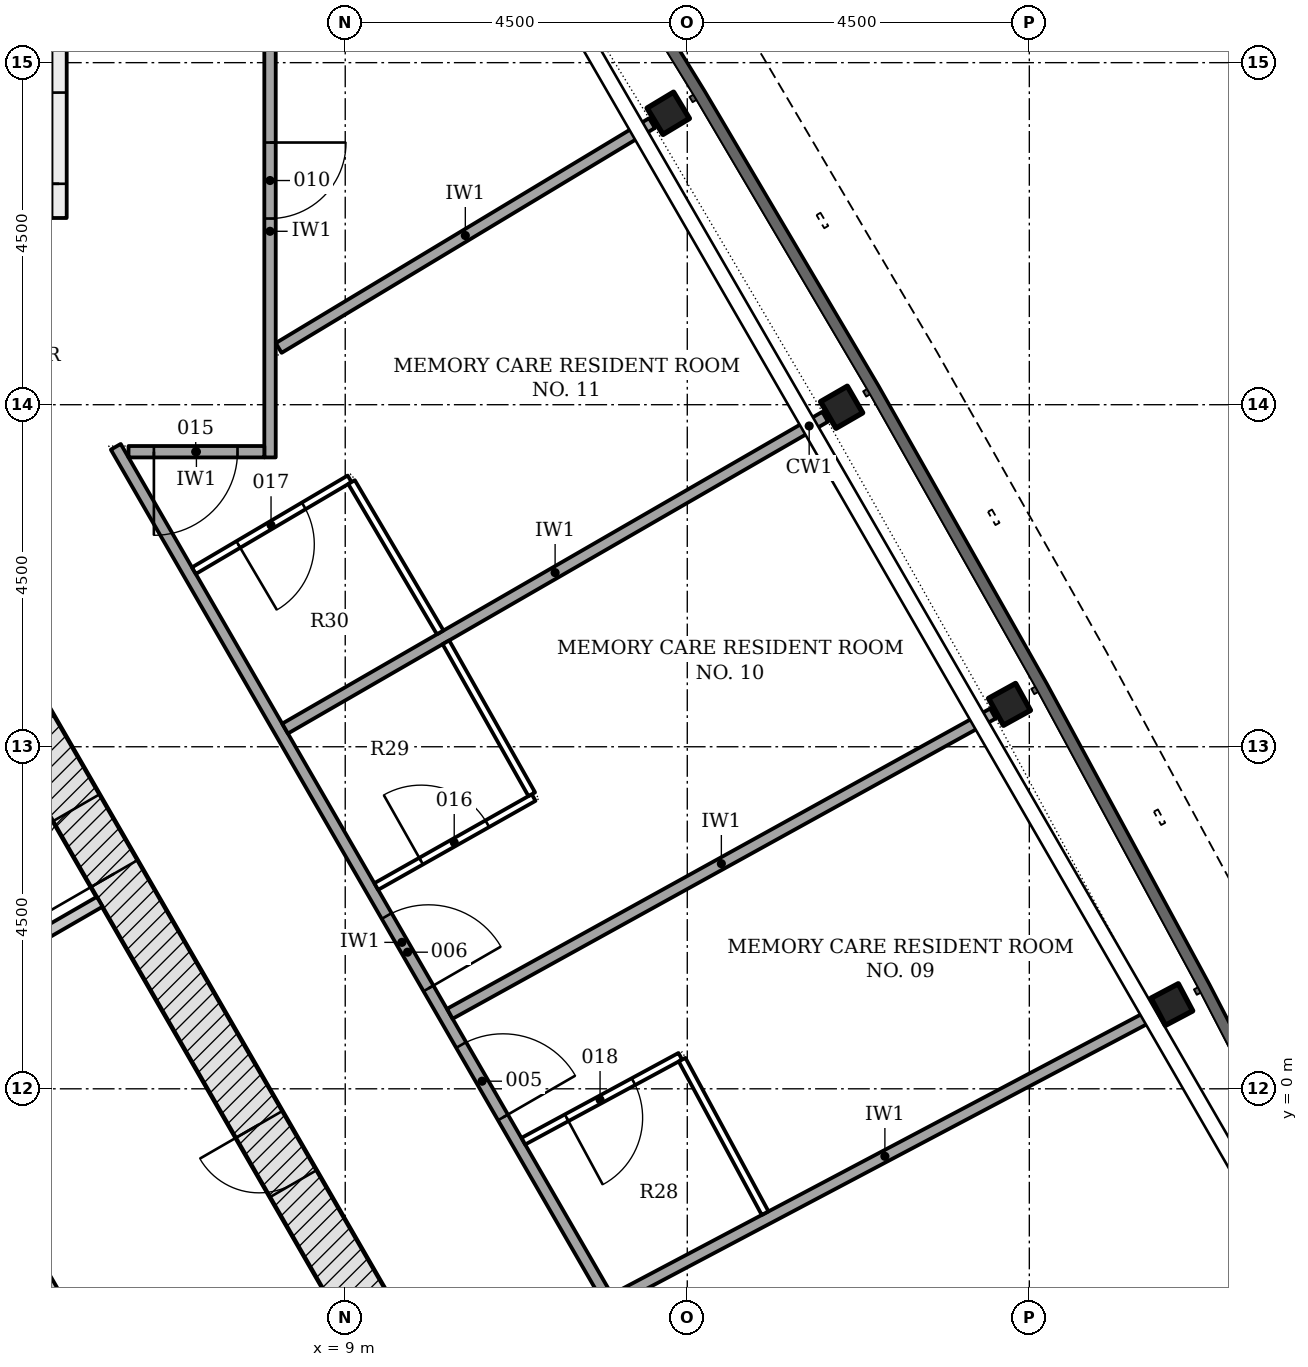
"""IFC4 building model, lengths in metres.
Left out: names, types, materials, properties, quantities, classifications, styles, units other than length and angle.
Written with IfcOpenShell. Run it as: python <this file> out.ifc"""

import sys

from ifc_helpers import new_model, si_unit, direction, frame, frame_2d, origin, origin_2d, place, context, subcontext, project, spatial, rectangle, i_section, extrude, element, fill, save


model = new_model("IFC4")
c1 = context("Model", 3, precision=1e-05, world=origin(), true_north=direction((0.0, 1.0)))
c2 = subcontext(c1, "Body", "Model", "MODEL_VIEW")
j1 = project(units=[si_unit("LENGTHUNIT", "METRE"), si_unit("PLANEANGLEUNIT", "RADIAN")], contexts=[c1])
p1 = place(None, origin())
s1 = spatial("IfcSite", under=j1, at=p1, CompositionType="ELEMENT")
p2 = place(p1, origin())
s2 = spatial("IfcBuilding", under=s1, at=p2, CompositionType="ELEMENT")
p3 = place(p2, frame((0.0, 0.0, 27.6)))
s3 = spatial("IfcBuildingStorey", under=s2, at=p3, CompositionType="ELEMENT", Elevation=27.6)
p4 = place(p3, frame((10.311, -4.703, -0.2), z_axis=(0.0, 0.0, 1.0), x_axis=(-0.500001446645, 0.866024568562, 0.0)))
e1 = element("IfcWall", 1, at=p4, inside=s3, PredefinedType="SHEAR", context=c2, shape_type="SweptSolid", body=[
    extrude(rectangle(XDim=18.458, YDim=0.7, at=frame_2d((9.229, 0.0))), origin(), (0.0, 0.0, 1.0), 3.6),
])
p5 = place(p4, frame((8.7, 0.0, 0.2)))
e2 = element("IfcOpeningElement", 2, at=p5, cuts=e1, PredefinedType="OPENING", context=c2, shape_type="SweptSolid", body=[
    extrude(rectangle(XDim=1.0, YDim=2.1, at=frame_2d((0.5, 1.05))), frame((0.0, 0.36, 0.0), z_axis=(0.0, -1.0, 0.0), x_axis=(1.0, 0.0, 0.0)), (0.0, 0.0, 1.0), 0.72),
])
p6 = place(p4, frame((3.99, 0.0, 0.2)))
e3 = element("IfcOpeningElement", 3, at=p6, cuts=e1, PredefinedType="OPENING", context=c2, shape_type="SweptSolid", body=[
    extrude(rectangle(XDim=0.9, YDim=2.1, at=frame_2d((0.45, 1.05))), frame((0.0, 0.36, 0.0), z_axis=(0.0, -1.0, 0.0), x_axis=(1.0, 0.0, 0.0)), (0.0, 0.0, 1.0), 0.72),
])
p7 = place(p4, frame((13.539, 0.0, 0.2)))
e4 = element("IfcOpeningElement", 4, at=p7, cuts=e1, PredefinedType="OPENING", context=c2, shape_type="SweptSolid", body=[
    extrude(rectangle(XDim=0.9, YDim=2.1, at=frame_2d((0.45, 1.05))), frame((0.0, 0.36, 0.0), z_axis=(0.0, -1.0, 0.0), x_axis=(1.0, 0.0, 0.0)), (0.0, 0.0, 1.0), 0.72),
])
for number, where, z_axis, x_axis in (
    (5, (19.875, 1.108, -0.2), (0.0, 0.0, 1.0), (-0.468, 0.884, 0.0)),
    (6, (17.739, 5.058, -0.2), (0.0, 0.0, 1.0), (-0.484, 0.875, 0.0)),
    (7, (15.531, 8.967, -0.2), (0.0, 0.0, 1.0), (-0.5, 0.866, 0.0)),
    (8, (13.25, 12.834, -0.2), (0.0, 0.0, 1.0), (-0.516, 0.857, 0.0)),
):
    element("IfcColumn", number, at=place(p3, frame(where, z_axis=z_axis, x_axis=x_axis)), inside=s3, PredefinedType="COLUMN", context=c2, shape_type="SweptSolid", body=[
        extrude(i_section(OverallWidth=0.404, OverallDepth=0.406, WebThickness=0.027, FlangeThickness=0.044, FilletRadius=0.015, at=origin_2d()), origin(), (0.0, 0.0, 1.0), 3.6),
    ])
p8 = place(p3, frame((-4.404, -3.413, 0.0), z_axis=(0.0, 0.0, 1.0), x_axis=(0.866022252853, 0.500005457533, 0.0)))
e9 = element("IfcWall", 9, at=p8, inside=s3, PredefinedType="PARTITIONING", context=c2, shape_type="SweptSolid", body=[
    extrude(rectangle(XDim=11.749, YDim=0.15, at=frame_2d((5.875, 0.0))), origin(), (0.0, 0.0, 1.0), 3.4),
])
p9 = place(p8, frame((3.875, 0.0, 0.0)))
e10 = element("IfcOpeningElement", 10, at=p9, cuts=e9, PredefinedType="OPENING", context=c2, shape_type="SweptSolid", body=[
    extrude(rectangle(XDim=0.9, YDim=2.1, at=frame_2d((0.45, 1.05))), frame((0.0, 0.085, 0.0), z_axis=(0.0, -1.0, 0.0), x_axis=(1.0, 0.0, 0.0)), (0.0, 0.0, 1.0), 0.17),
])
p10 = place(p3, frame((5.598, -3.439, 0.0), z_axis=(0.0, 0.0, 1.0), x_axis=(-0.500007155043, 0.866021272779, 0.0)))
e11 = element("IfcWall", 11, at=p10, inside=s3, PredefinedType="PARTITIONING", context=c2, shape_type="SweptSolid", body=[
    extrude(rectangle(XDim=4.949, YDim=0.15, at=frame_2d((2.474, 0.0))), origin(), (0.0, 0.0, 1.0), 3.4),
])
p11 = place(p3, frame((5.236, 11.456, -0.2), z_axis=(0.0, 0.0, 1.0), x_axis=(0.0, 1.0, 0.0)))
e12 = element("IfcWall", 12, at=p11, inside=s3, PredefinedType="SHEAR", context=c2, shape_type="SweptSolid", body=[
    extrude(rectangle(XDim=5.6, YDim=0.2, at=frame_2d((2.8, 0.0))), origin(), (0.0, 0.0, 1.0), 3.6),
])
p12 = place(p11, frame((0.45, 0.0, 0.2)))
e13 = element("IfcOpeningElement", 13, at=p12, cuts=e12, PredefinedType="OPENING", context=c2, shape_type="SweptSolid", body=[
    extrude(rectangle(XDim=1.2, YDim=2.1, at=frame_2d((0.6, 1.05))), frame((0.0, 0.11, 0.0), z_axis=(0.0, -1.0, 0.0), x_axis=(1.0, 0.0, 0.0)), (0.0, 0.0, 1.0), 0.22),
])
p13 = place(p3, frame((5.981, 8.446, 0.0), z_axis=(0.0, 0.0, 1.0), x_axis=(0.499996620721, -0.866027354803, 0.0)))
e14 = element("IfcWall", 14, at=p13, inside=s3, PredefinedType="PARTITIONING", context=c2, shape_type="SweptSolid", body=[
    extrude(rectangle(XDim=15.057, YDim=0.15, at=frame_2d((7.528, 0.0))), origin(), (0.0, 0.0, 1.0), 2.768),
])
p14 = place(p13, frame((9.087, 0.0, 0.0)))
e15 = element("IfcOpeningElement", 15, at=p14, cuts=e14, PredefinedType="OPENING", context=c2, shape_type="SweptSolid", body=[
    extrude(rectangle(XDim=1.1, YDim=2.1, at=frame_2d((0.55, 1.05))), frame((0.0, 0.085, 0.0), z_axis=(0.0, -1.0, 0.0), x_axis=(1.0, 0.0, 0.0)), (0.0, 0.0, 1.0), 0.17),
])
p15 = place(p13, frame((7.128, 0.0, 0.0)))
e16 = element("IfcOpeningElement", 16, at=p15, cuts=e14, PredefinedType="OPENING", context=c2, shape_type="SweptSolid", body=[
    extrude(rectangle(XDim=1.1, YDim=2.1, at=frame_2d((0.55, 1.05))), frame((0.0, 0.085, 0.0), z_axis=(0.0, -1.0, 0.0), x_axis=(1.0, 0.0, 0.0)), (0.0, 0.0, 1.0), 0.17),
])
p16 = place(p3, frame((8.01, 14.256, 0.0), z_axis=(0.0, 0.0, 1.0), x_axis=(0.0, -1.0, 0.0)))
e17 = element("IfcWall", 17, at=p16, inside=s3, PredefinedType="PARTITIONING", context=c2, shape_type="SweptSolid", body=[
    extrude(rectangle(XDim=5.95, YDim=0.15, at=frame_2d((2.975, 0.0))), origin(), (0.0, 0.0, 1.0), 2.768),
])
p17 = place(p16, frame((1.807, 0.0, 0.0)))
e18 = element("IfcOpeningElement", 18, at=p17, cuts=e17, PredefinedType="OPENING", context=c2, shape_type="SweptSolid", body=[
    extrude(rectangle(XDim=1.0, YDim=2.1, at=frame_2d((0.5, 1.05))), frame((0.0, 0.085, 0.0), z_axis=(0.0, -1.0, 0.0), x_axis=(1.0, 0.0, 0.0)), (0.0, 0.0, 1.0), 0.17),
])
p18 = place(p3, frame((7.936, 8.381, 0.0), z_axis=(0.0, 0.0, 1.0), x_axis=(-1.0, 0.0, 0.0)))
e19 = element("IfcWall", 19, at=p18, inside=s3, PredefinedType="PARTITIONING", context=c2, shape_type="SweptSolid", body=[
    extrude(rectangle(XDim=1.787, YDim=0.15, at=frame_2d((0.894, 0.0))), origin(), (0.0, 0.0, 1.0), 2.768),
])
p19 = place(p18, frame((0.353, 0.0, 0.0)))
e20 = element("IfcOpeningElement", 20, at=p19, cuts=e19, PredefinedType="OPENING", context=c2, shape_type="SweptSolid", body=[
    extrude(rectangle(XDim=1.1, YDim=2.1, at=frame_2d((0.55, 1.05))), frame((0.0, 0.085, 0.0), z_axis=(0.0, -1.0, 0.0), x_axis=(1.0, 0.0, 0.0)), (0.0, 0.0, 1.0), 0.17),
])
p20 = place(p3, frame((15.314, 8.842, 0.0), z_axis=(0.0, 0.0, 1.0), x_axis=(-0.866015124653, -0.500017803555, 0.0)))
e21 = element("IfcWall", 21, at=p20, inside=s3, PredefinedType="PARTITIONING", context=c2, shape_type="SweptSolid", body=[
    extrude(rectangle(XDim=8.205, YDim=0.15, at=frame_2d((4.103, 0.0))), origin(), (0.0, 0.0, 1.0), 2.768),
])
p21 = place(p3, frame((17.521, 4.937, 0.0), z_axis=(0.0, 0.0, 1.0), x_axis=(-0.875148563779, -0.483854307944, 0.0)))
e22 = element("IfcWall", 22, at=p21, inside=s3, PredefinedType="PARTITIONING", context=c2, shape_type="SweptSolid", body=[
    extrude(rectangle(XDim=8.164, YDim=0.15, at=frame_2d((4.082, 0.0))), origin(), (0.0, 0.0, 1.0), 2.768),
])
p22 = place(p3, frame((19.654, 0.992, 0.0), z_axis=(0.0, 0.0, 1.0), x_axis=(-0.883980590433, -0.467523599124, 0.0)))
e23 = element("IfcWall", 23, at=p22, inside=s3, PredefinedType="PARTITIONING", context=c2, shape_type="SweptSolid", body=[
    extrude(rectangle(XDim=8.041, YDim=0.15, at=frame_2d((4.021, 0.0))), origin(), (0.0, 0.0, 1.0), 2.768),
])
p23 = place(p3, frame((13.036, 12.705, 0.0), z_axis=(0.0, 0.0, 1.0), x_axis=(-0.856612490534, -0.515960309579, 0.0)))
e24 = element("IfcWall", 24, at=p23, inside=s3, PredefinedType="PARTITIONING", context=c2, shape_type="SweptSolid", body=[
    extrude(rectangle(XDim=5.733, YDim=0.15, at=frame_2d((2.867, 0.0))), origin(), (0.0, 0.0, 1.0), 2.768),
])
p24 = place(p3, frame((9.408, 2.662, 0.0), z_axis=(0.0, 0.0, 1.0), x_axis=(0.870608725809, 0.491976062981, 0.0)))
e25 = element("IfcWall", 25, at=p24, inside=s3, PredefinedType="PARTITIONING", context=c2, shape_type="SweptSolid", body=[
    extrude(rectangle(XDim=2.378, YDim=0.1, at=frame_2d((1.189, 0.0))), origin(), (0.0, 0.0, 1.0), 3.4),
])
p25 = place(p24, frame((0.678, 0.0, 0.0)))
e26 = element("IfcOpeningElement", 26, at=p25, cuts=e25, PredefinedType="OPENING", context=c2, shape_type="SweptSolid", body=[
    extrude(rectangle(XDim=1.0, YDim=2.1, at=frame_2d((0.5, 1.05))), frame((0.0, 0.06, 0.0), z_axis=(0.0, -1.0, 0.0), x_axis=(1.0, 0.0, 0.0)), (0.0, 0.0, 1.0), 0.12),
])
p26 = place(p3, frame((9.058, 8.025, 0.0), z_axis=(0.0, 0.0, 1.0), x_axis=(-0.861363599661, -0.507988926236, 0.0)))
e27 = element("IfcWall", 27, at=p26, inside=s3, PredefinedType="PARTITIONING", context=c2, shape_type="SweptSolid", body=[
    extrude(rectangle(XDim=2.378, YDim=0.1, at=frame_2d((1.189, 0.0))), origin(), (0.0, 0.0, 1.0), 3.4),
])
p27 = place(p26, frame((0.7, 0.0, 0.0)))
e28 = element("IfcOpeningElement", 28, at=p27, cuts=e27, PredefinedType="OPENING", context=c2, shape_type="SweptSolid", body=[
    extrude(rectangle(XDim=1.0, YDim=2.1, at=frame_2d((0.5, 1.05))), frame((0.0, 0.06, 0.0), z_axis=(0.0, -1.0, 0.0), x_axis=(1.0, 0.0, 0.0)), (0.0, 0.0, 1.0), 0.12),
])
p28 = place(p3, frame((13.408, 0.427, 0.0), z_axis=(0.0, 0.0, 1.0), x_axis=(-0.879611235398, -0.475693256797, 0.0)))
e29 = element("IfcWall", 29, at=p28, inside=s3, PredefinedType="PARTITIONING", context=c2, shape_type="SweptSolid", body=[
    extrude(rectangle(XDim=2.347, YDim=0.1, at=frame_2d((1.173, 0.0))), origin(), (0.0, 0.0, 1.0), 3.4),
])
p29 = place(p28, frame((0.7, 0.0, 0.0)))
e30 = element("IfcOpeningElement", 30, at=p29, cuts=e29, PredefinedType="OPENING", context=c2, shape_type="SweptSolid", body=[
    extrude(rectangle(XDim=1.0, YDim=2.1, at=frame_2d((0.5, 1.05))), frame((0.0, 0.06, 0.0), z_axis=(0.0, -1.0, 0.0), x_axis=(1.0, 0.0, 0.0)), (0.0, 0.0, 1.0), 0.12),
])
for number, where, z_axis, x_axis in (
    (31, (14.524, -1.636, 0.0), (0.0, 0.0, 1.0), (-0.476, 0.88, 0.0)),
    (32, (10.325, 5.874, 0.0), (0.0, 0.0, 1.0), (0.492, -0.871, 0.0)),
    (33, (10.249, 6.004, 0.0), (0.0, 0.0, 1.0), (-0.508, 0.861, 0.0)),
):
    element("IfcWall", number, at=place(p3, frame(where, z_axis=z_axis, x_axis=x_axis)), inside=s3, PredefinedType="PARTITIONING", context=c2, shape_type="SweptSolid", body=[
        extrude(rectangle(XDim=2.296, YDim=0.1, at=frame_2d((1.148, 0.0))), origin(), (0.0, 0.0, 1.0), 2.768),
    ])
p30 = place(p5, origin())
e34 = element("IfcDoor", 34, at=p30, inside=s3, OperationType="SINGLE_SWING_LEFT", PredefinedType="DOOR", context=c2, shape_type="SweptSolid", body=[
    extrude(rectangle(XDim=1.0, YDim=2.1, at=frame_2d((0.5, 1.05))), frame((0.0, 0.075, 0.0), z_axis=(0.0, -1.0, 0.0), x_axis=(1.0, 0.0, 0.0)), (0.0, 0.0, 1.0), 0.15),
])
fill(e2, e34)
p31 = place(p6, origin())
e35 = element("IfcDoor", 35, at=p31, inside=s3, OperationType="SINGLE_SWING_RIGHT", PredefinedType="DOOR", context=c2, shape_type="SweptSolid", body=[
    extrude(rectangle(XDim=0.9, YDim=2.1, at=frame_2d((0.45, 1.05))), frame((0.0, 0.075, 0.0), z_axis=(0.0, -1.0, 0.0), x_axis=(1.0, 0.0, 0.0)), (0.0, 0.0, 1.0), 0.15),
])
fill(e3, e35)
p32 = place(p12, origin())
e36 = element("IfcDoor", 36, at=p32, inside=s3, OperationType="SINGLE_SWING_LEFT", PredefinedType="DOOR", context=c2, shape_type="SweptSolid", body=[
    extrude(rectangle(XDim=1.2, YDim=2.1, at=frame_2d((0.6, 1.05))), frame((0.0, 0.025, 0.0), z_axis=(0.0, -1.0, 0.0), x_axis=(1.0, 0.0, 0.0)), (0.0, 0.0, 1.0), 0.05),
])
fill(e13, e36)
p33 = place(p14, origin())
e37 = element("IfcDoor", 37, at=p33, inside=s3, OperationType="SINGLE_SWING_RIGHT", PredefinedType="DOOR", context=c2, shape_type="SweptSolid", body=[
    extrude(rectangle(XDim=1.1, YDim=2.1, at=frame_2d((0.55, 1.05))), frame((0.0, 0.025, 0.0), z_axis=(0.0, -1.0, 0.0), x_axis=(1.0, 0.0, 0.0)), (0.0, 0.0, 1.0), 0.05),
])
fill(e15, e37)
p34 = place(p15, origin())
e38 = element("IfcDoor", 38, at=p34, inside=s3, OperationType="SINGLE_SWING_RIGHT", PredefinedType="DOOR", context=c2, shape_type="SweptSolid", body=[
    extrude(rectangle(XDim=1.1, YDim=2.1, at=frame_2d((0.55, 1.05))), frame((0.0, 0.025, 0.0), z_axis=(0.0, -1.0, 0.0), x_axis=(1.0, 0.0, 0.0)), (0.0, 0.0, 1.0), 0.05),
])
fill(e16, e38)
p35 = place(p17, origin())
e39 = element("IfcDoor", 39, at=p35, inside=s3, OperationType="SINGLE_SWING_LEFT", PredefinedType="DOOR", context=c2, shape_type="SweptSolid", body=[
    extrude(rectangle(XDim=1.0, YDim=2.1, at=frame_2d((0.5, 1.05))), frame((0.0, 0.025, 0.0), z_axis=(0.0, -1.0, 0.0), x_axis=(1.0, 0.0, 0.0)), (0.0, 0.0, 1.0), 0.05),
])
fill(e18, e39)
p36 = place(p19, origin())
e40 = element("IfcDoor", 40, at=p36, inside=s3, OperationType="SINGLE_SWING_RIGHT", PredefinedType="DOOR", context=c2, shape_type="SweptSolid", body=[
    extrude(rectangle(XDim=1.1, YDim=2.1, at=frame_2d((0.55, 1.05))), frame((0.0, 0.025, 0.0), z_axis=(0.0, -1.0, 0.0), x_axis=(1.0, 0.0, 0.0)), (0.0, 0.0, 1.0), 0.05),
])
fill(e20, e40)
p37 = place(p25, origin())
e41 = element("IfcDoor", 41, at=p37, inside=s3, OperationType="SINGLE_SWING_LEFT", PredefinedType="DOOR", context=c2, shape_type="SweptSolid", body=[
    extrude(rectangle(XDim=1.0, YDim=2.1, at=frame_2d((0.5, 1.05))), frame((0.0, 0.025, 0.0), z_axis=(0.0, -1.0, 0.0), x_axis=(1.0, 0.0, 0.0)), (0.0, 0.0, 1.0), 0.05),
])
fill(e26, e41)
p38 = place(p27, origin())
e42 = element("IfcDoor", 42, at=p38, inside=s3, OperationType="SINGLE_SWING_RIGHT", PredefinedType="DOOR", context=c2, shape_type="SweptSolid", body=[
    extrude(rectangle(XDim=1.0, YDim=2.1, at=frame_2d((0.5, 1.05))), frame((0.0, 0.025, 0.0), z_axis=(0.0, -1.0, 0.0), x_axis=(1.0, 0.0, 0.0)), (0.0, 0.0, 1.0), 0.05),
])
fill(e28, e42)
p39 = place(p29, origin())
e43 = element("IfcDoor", 43, at=p39, inside=s3, OperationType="SINGLE_SWING_RIGHT", PredefinedType="DOOR", context=c2, shape_type="SweptSolid", body=[
    extrude(rectangle(XDim=1.0, YDim=2.1, at=frame_2d((0.5, 1.05))), frame((0.0, 0.025, 0.0), z_axis=(0.0, -1.0, 0.0), x_axis=(1.0, 0.0, 0.0)), (0.0, 0.0, 1.0), 0.05),
])
fill(e30, e43)
save(model, sys.argv[1])
